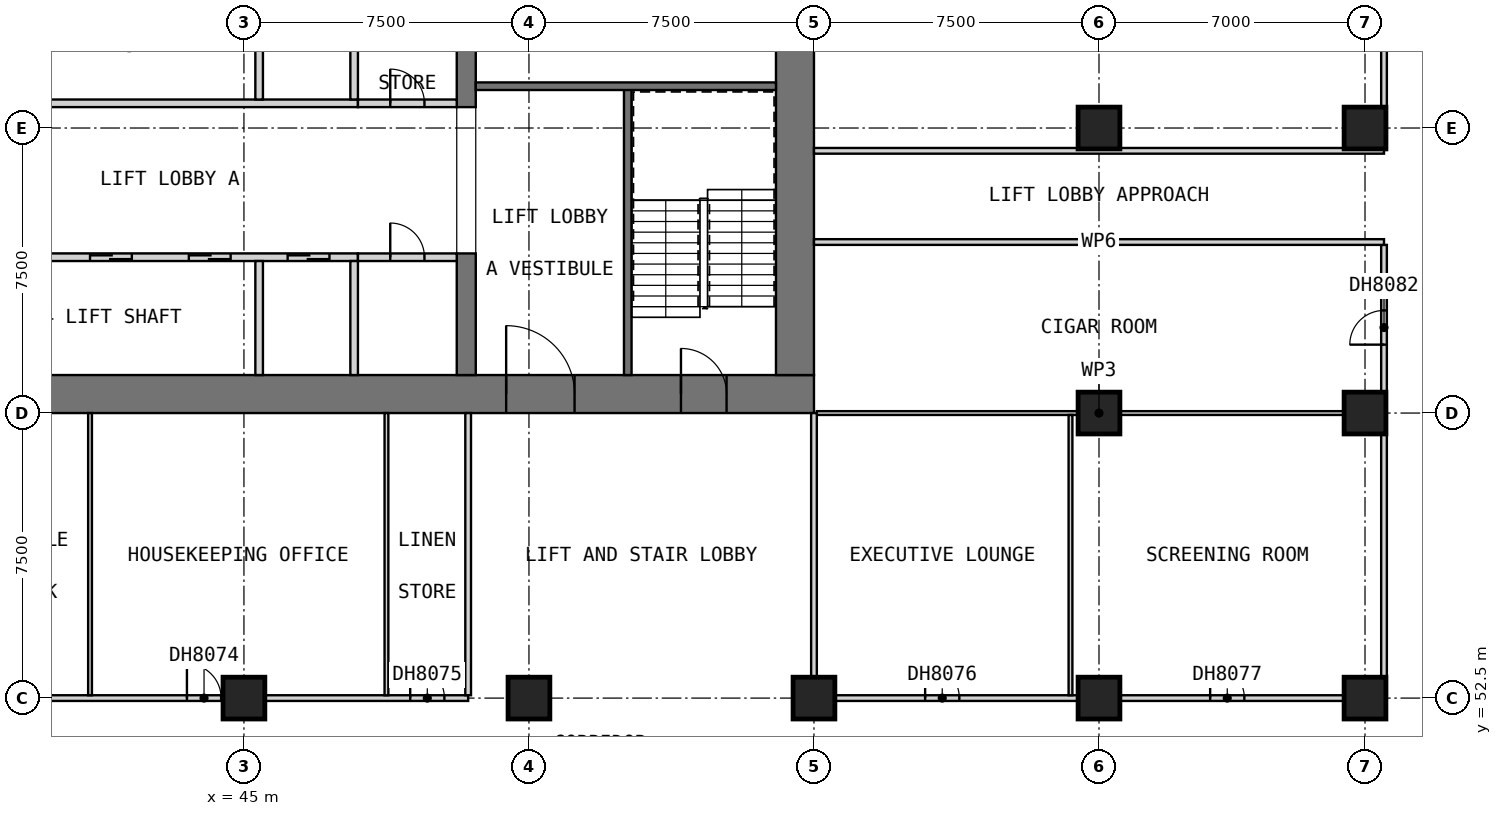
"""IFC4 building model, lengths in metres.
Left out: names, types, materials, properties, quantities, classifications, styles, units other than length and angle.
Written with IfcOpenShell. Run it as: python <this file> out.ifc"""

import sys

from ifc_helpers import new_model, si_unit, direction, frame, frame_2d, origin, origin_2d, place, context, subcontext, project, spatial, rectangle, extrude, element, fill, save


model = new_model("IFC4")
c1 = context("Model", 3, precision=1e-05, world=origin(), true_north=direction((0.0, 1.0)))
c2 = subcontext(c1, "Body", "Model", "MODEL_VIEW")
j1 = project(units=[si_unit("LENGTHUNIT", "METRE"), si_unit("PLANEANGLEUNIT", "RADIAN")], contexts=[c1])
p1 = place(None, origin())
s1 = spatial("IfcSite", under=j1, at=p1, CompositionType="ELEMENT")
p2 = place(p1, origin())
s2 = spatial("IfcBuilding", under=s1, at=p2, CompositionType="ELEMENT")
p3 = place(p2, frame((0.0, 0.0, 89.9)))
s3 = spatial("IfcBuildingStorey", under=s2, at=p3, CompositionType="ELEMENT", Elevation=89.9)
for number, where, z_axis, x_axis in (
    (1, (45.0, 52.5, 0.0), (0.0, 0.0, 1.0), (1.0, 0.0, 0.0)),
    (2, (52.5, 52.5, 0.0), (0.0, 0.0, 1.0), (1.0, 0.0, 0.0)),
    (3, (60.0, 52.5, 0.0), (0.0, 0.0, 1.0), (1.0, 0.0, 0.0)),
    (4, (67.5, 52.5, 0.0), (0.0, 0.0, 1.0), (1.0, 0.0, 0.0)),
    (5, (67.5, 60.0, 0.0), (0.0, 0.0, 1.0), (1.0, 0.0, 0.0)),
    (6, (67.5, 67.5, 0.0), (0.0, 0.0, 1.0), (1.0, 0.0, 0.0)),
    (7, (74.5, 52.5, 0.0), (0.0, 0.0, 1.0), (1.0, 0.0, 0.0)),
    (8, (74.5, 60.0, 0.0), (0.0, 0.0, 1.0), (1.0, 0.0, 0.0)),
    (9, (74.5, 67.5, 0.0), (0.0, 0.0, 1.0), (1.0, 0.0, 0.0)),
):
    element("IfcColumn", number, at=place(p3, frame(where, z_axis=z_axis, x_axis=x_axis)), inside=s3, PredefinedType="COLUMN", context=c2, shape_type="SweptSolid", body=[
        extrude(rectangle(XDim=1.1, YDim=1.1, at=origin_2d()), origin(), (0.0, 0.0, 1.0), 3.6),
    ])
p4 = place(p3, frame((30.0, 60.5, 0.0), z_axis=(0.0, 0.0, 1.0), x_axis=(1.0, 0.0, 0.0)))
e10 = element("IfcWall", 10, at=p4, inside=s3, PredefinedType="SHEAR", context=c2, shape_type="SweptSolid", body=[
    extrude(rectangle(XDim=30.0, YDim=1.0, at=frame_2d((15.0, 0.0))), origin(), (0.0, 0.0, 1.0), 3.6),
])
p5 = place(p4, frame((21.9, 0.0, 0.0)))
e11 = element("IfcOpeningElement", 11, at=p5, cuts=e10, PredefinedType="OPENING", context=c2, shape_type="SweptSolid", body=[
    extrude(rectangle(XDim=1.8, YDim=2.1, at=frame_2d((0.9, 1.05))), frame((0.0, 0.51, 0.0), z_axis=(0.0, -1.0, 0.0), x_axis=(1.0, 0.0, 0.0)), (0.0, 0.0, 1.0), 1.02),
])
p6 = place(p4, frame((26.5, 0.0, 0.0)))
e12 = element("IfcOpeningElement", 12, at=p6, cuts=e10, PredefinedType="OPENING", context=c2, shape_type="SweptSolid", body=[
    extrude(rectangle(XDim=1.2, YDim=2.1, at=frame_2d((0.6, 1.05))), frame((0.0, 0.51, 0.0), z_axis=(0.0, -1.0, 0.0), x_axis=(1.0, 0.0, 0.0)), (0.0, 0.0, 1.0), 1.02),
])
p7 = place(p3, frame((59.5, 61.0, 0.0), z_axis=(0.0, 0.0, 1.0), x_axis=(0.0, 1.0, 0.0)))
e13 = element("IfcWall", 13, at=p7, inside=s3, PredefinedType="SHEAR", context=c2, shape_type="SweptSolid", body=[
    extrude(rectangle(XDim=20.5, YDim=1.0, at=frame_2d((10.25, 0.0))), origin(), (0.0, 0.0, 1.0), 3.6),
])
p8 = place(p7, frame((14.5, 0.0, 0.0)))
e14 = element("IfcOpeningElement", 14, at=p8, cuts=e13, PredefinedType="OPENING", context=c2, shape_type="SweptSolid", body=[
    extrude(rectangle(XDim=1.8, YDim=2.1, at=frame_2d((0.9, 1.05))), frame((0.0, 0.51, 0.0), z_axis=(0.0, -1.0, 0.0), x_axis=(1.0, 0.0, 0.0)), (0.0, 0.0, 1.0), 1.02),
])
p9 = place(p3, frame((50.85, 61.0, 0.0), z_axis=(0.0, 0.0, 1.0), x_axis=(0.0, 1.0, 0.0)))
e15 = element("IfcWall", 15, at=p9, inside=s3, PredefinedType="SHEAR", context=c2, shape_type="SweptSolid", body=[
    extrude(rectangle(XDim=3.2, YDim=0.5, at=frame_2d((1.6, 0.0))), origin(), (0.0, 0.0, 1.0), 3.6),
])
p10 = place(p3, frame((50.85, 68.05, 0.0), z_axis=(0.0, 0.0, 1.0), x_axis=(0.0, 1.0, 0.0)))
e16 = element("IfcWall", 16, at=p10, inside=s3, PredefinedType="SHEAR", context=c2, shape_type="SweptSolid", body=[
    extrude(rectangle(XDim=6.4, YDim=0.5, at=frame_2d((3.2, 0.0))), origin(), (0.0, 0.0, 1.0), 3.6),
])
p11 = place(p3, frame((35.0, 64.1, 0.0), z_axis=(0.0, 0.0, 1.0), x_axis=(1.0, 0.0, 0.0)))
e17 = element("IfcWall", 17, at=p11, inside=s3, PredefinedType="SOLIDWALL", context=c2, shape_type="SweptSolid", body=[
    extrude(rectangle(XDim=13.0, YDim=0.2, at=frame_2d((6.5, 0.0))), origin(), (0.0, 0.0, 1.0), 3.6),
])
p12 = place(p11, frame((0.75, 0.0, 0.0)))
e18 = element("IfcOpeningElement", 18, at=p12, cuts=e17, PredefinedType="OPENING", context=c2, shape_type="SweptSolid", body=[
    extrude(rectangle(XDim=1.1, YDim=2.1, at=frame_2d((0.55, 1.05))), frame((0.0, 0.11, 0.0), z_axis=(0.0, -1.0, 0.0), x_axis=(1.0, 0.0, 0.0)), (0.0, 0.0, 1.0), 0.22),
])
p13 = place(p11, frame((3.35, 0.0, 0.0)))
e19 = element("IfcOpeningElement", 19, at=p13, cuts=e17, PredefinedType="OPENING", context=c2, shape_type="SweptSolid", body=[
    extrude(rectangle(XDim=1.1, YDim=2.1, at=frame_2d((0.55, 1.05))), frame((0.0, 0.11, 0.0), z_axis=(0.0, -1.0, 0.0), x_axis=(1.0, 0.0, 0.0)), (0.0, 0.0, 1.0), 0.22),
])
p14 = place(p11, frame((5.95, 0.0, 0.0)))
e20 = element("IfcOpeningElement", 20, at=p14, cuts=e17, PredefinedType="OPENING", context=c2, shape_type="SweptSolid", body=[
    extrude(rectangle(XDim=1.1, YDim=2.1, at=frame_2d((0.55, 1.05))), frame((0.0, 0.11, 0.0), z_axis=(0.0, -1.0, 0.0), x_axis=(1.0, 0.0, 0.0)), (0.0, 0.0, 1.0), 0.22),
])
p15 = place(p11, frame((8.55, 0.0, 0.0)))
e21 = element("IfcOpeningElement", 21, at=p15, cuts=e17, PredefinedType="OPENING", context=c2, shape_type="SweptSolid", body=[
    extrude(rectangle(XDim=1.1, YDim=2.1, at=frame_2d((0.55, 1.05))), frame((0.0, 0.11, 0.0), z_axis=(0.0, -1.0, 0.0), x_axis=(1.0, 0.0, 0.0)), (0.0, 0.0, 1.0), 0.22),
])
p16 = place(p11, frame((11.15, 0.0, 0.0)))
e22 = element("IfcOpeningElement", 22, at=p16, cuts=e17, PredefinedType="OPENING", context=c2, shape_type="SweptSolid", body=[
    extrude(rectangle(XDim=1.1, YDim=2.1, at=frame_2d((0.55, 1.05))), frame((0.0, 0.11, 0.0), z_axis=(0.0, -1.0, 0.0), x_axis=(1.0, 0.0, 0.0)), (0.0, 0.0, 1.0), 0.22),
])
for number, where, z_axis, x_axis in (
    (23, (45.4, 61.0, 0.0), (0.0, 0.0, 1.0), (0.0, 1.0, 0.0)),
    (24, (47.9, 61.0, 0.0), (0.0, 0.0, 1.0), (0.0, 1.0, 0.0)),
):
    element("IfcWall", number, at=place(p3, frame(where, z_axis=z_axis, x_axis=x_axis)), inside=s3, PredefinedType="SOLIDWALL", context=c2, shape_type="SweptSolid", body=[
        extrude(rectangle(XDim=3.0, YDim=0.2, at=frame_2d((1.5, 0.0))), origin(), (0.0, 0.0, 1.0), 3.6),
    ])
p17 = place(p3, frame((48.0, 64.1, 0.0), z_axis=(0.0, 0.0, 1.0), x_axis=(1.0, 0.0, 0.0)))
e25 = element("IfcWall", 25, at=p17, inside=s3, PredefinedType="PARTITIONING", context=c2, shape_type="SweptSolid", body=[
    extrude(rectangle(XDim=2.6, YDim=0.2, at=frame_2d((1.3, 0.0))), origin(), (0.0, 0.0, 1.0), 3.35),
])
p18 = place(p17, frame((0.85, 0.0, 0.0)))
e26 = element("IfcOpeningElement", 26, at=p18, cuts=e25, PredefinedType="OPENING", context=c2, shape_type="SweptSolid", body=[
    extrude(rectangle(XDim=0.9, YDim=2.1, at=frame_2d((0.45, 1.05))), frame((0.0, 0.11, 0.0), z_axis=(0.0, -1.0, 0.0), x_axis=(1.0, 0.0, 0.0)), (0.0, 0.0, 1.0), 0.22),
])
p19 = place(p3, frame((35.0, 68.15, 0.0), z_axis=(0.0, 0.0, 1.0), x_axis=(1.0, 0.0, 0.0)))
e27 = element("IfcWall", 27, at=p19, inside=s3, PredefinedType="SOLIDWALL", context=c2, shape_type="SweptSolid", body=[
    extrude(rectangle(XDim=13.0, YDim=0.2, at=frame_2d((6.5, 0.0))), origin(), (0.0, 0.0, 1.0), 3.6),
])
p20 = place(p19, frame((0.75, 0.0, 0.0)))
e28 = element("IfcOpeningElement", 28, at=p20, cuts=e27, PredefinedType="OPENING", context=c2, shape_type="SweptSolid", body=[
    extrude(rectangle(XDim=1.1, YDim=2.1, at=frame_2d((0.55, 1.05))), frame((0.0, 0.11, 0.0), z_axis=(0.0, -1.0, 0.0), x_axis=(1.0, 0.0, 0.0)), (0.0, 0.0, 1.0), 0.22),
])
for number, where, z_axis, x_axis in (
    (29, (45.4, 68.25, 0.0), (0.0, 0.0, 1.0), (0.0, 1.0, 0.0)),
    (30, (47.9, 68.25, 0.0), (0.0, 0.0, 1.0), (0.0, 1.0, 0.0)),
):
    element("IfcWall", number, at=place(p3, frame(where, z_axis=z_axis, x_axis=x_axis)), inside=s3, PredefinedType="SOLIDWALL", context=c2, shape_type="SweptSolid", body=[
        extrude(rectangle(XDim=2.75, YDim=0.2, at=frame_2d((1.375, 0.0))), origin(), (0.0, 0.0, 1.0), 3.6),
    ])
p21 = place(p3, frame((48.0, 68.15, 0.0), z_axis=(0.0, 0.0, 1.0), x_axis=(1.0, 0.0, 0.0)))
e31 = element("IfcWall", 31, at=p21, inside=s3, PredefinedType="PARTITIONING", context=c2, shape_type="SweptSolid", body=[
    extrude(rectangle(XDim=2.6, YDim=0.2, at=frame_2d((1.3, 0.0))), origin(), (0.0, 0.0, 1.0), 3.35),
])
p22 = place(p21, frame((0.85, 0.0, 0.0)))
e32 = element("IfcOpeningElement", 32, at=p22, cuts=e31, PredefinedType="OPENING", context=c2, shape_type="SweptSolid", body=[
    extrude(rectangle(XDim=0.9, YDim=2.1, at=frame_2d((0.45, 1.05))), frame((0.0, 0.11, 0.0), z_axis=(0.0, -1.0, 0.0), x_axis=(1.0, 0.0, 0.0)), (0.0, 0.0, 1.0), 0.22),
])
p23 = place(p3, frame((55.1, 61.0, 0.0), z_axis=(0.0, 0.0, 1.0), x_axis=(0.0, 1.0, 0.0)))
e33 = element("IfcWall", 33, at=p23, inside=s3, PredefinedType="SOLIDWALL", context=c2, shape_type="SweptSolid", body=[
    extrude(rectangle(XDim=7.6, YDim=0.2, at=frame_2d((3.8, 0.0))), origin(), (0.0, 0.0, 1.0), 3.35),
])
p24 = place(p3, frame((51.1, 68.6, 0.0), z_axis=(0.0, 0.0, 1.0), x_axis=(1.0, 0.0, 0.0)))
e34 = element("IfcWall", 34, at=p24, inside=s3, PredefinedType="SOLIDWALL", context=c2, shape_type="SweptSolid", body=[
    extrude(rectangle(XDim=7.9, YDim=0.2, at=frame_2d((3.95, 0.0))), origin(), (0.0, 0.0, 1.0), 3.35),
])
p25 = place(p3, frame((33.75, 52.5, 0.0), z_axis=(0.0, 0.0, 1.0), x_axis=(1.0, 0.0, 0.0)))
e35 = element("IfcWall", 35, at=p25, inside=s3, PredefinedType="PARTITIONING", context=c2, shape_type="SweptSolid", body=[
    extrude(rectangle(XDim=17.15, YDim=0.15, at=frame_2d((8.575, 0.0))), origin(), (0.0, 0.0, 1.0), 3.35),
])
p26 = place(p25, frame((1.05, 0.0, 0.0)))
e36 = element("IfcOpeningElement", 36, at=p26, cuts=e35, PredefinedType="OPENING", context=c2, shape_type="SweptSolid", body=[
    extrude(rectangle(XDim=0.9, YDim=2.1, at=frame_2d((0.45, 1.05))), frame((0.0, 0.085, 0.0), z_axis=(0.0, -1.0, 0.0), x_axis=(1.0, 0.0, 0.0)), (0.0, 0.0, 1.0), 0.17),
])
p27 = place(p25, frame((4.65, 0.0, 0.0)))
e37 = element("IfcOpeningElement", 37, at=p27, cuts=e35, PredefinedType="OPENING", context=c2, shape_type="SweptSolid", body=[
    extrude(rectangle(XDim=0.9, YDim=2.1, at=frame_2d((0.45, 1.05))), frame((0.0, 0.085, 0.0), z_axis=(0.0, -1.0, 0.0), x_axis=(1.0, 0.0, 0.0)), (0.0, 0.0, 1.0), 0.17),
])
p28 = place(p25, frame((9.75, 0.0, 0.0)))
e38 = element("IfcOpeningElement", 38, at=p28, cuts=e35, PredefinedType="OPENING", context=c2, shape_type="SweptSolid", body=[
    extrude(rectangle(XDim=0.9, YDim=2.1, at=frame_2d((0.45, 1.05))), frame((0.0, 0.085, 0.0), z_axis=(0.0, -1.0, 0.0), x_axis=(1.0, 0.0, 0.0)), (0.0, 0.0, 1.0), 0.17),
])
p29 = place(p25, frame((15.625, 0.0, 0.0)))
e39 = element("IfcOpeningElement", 39, at=p29, cuts=e35, PredefinedType="OPENING", context=c2, shape_type="SweptSolid", body=[
    extrude(rectangle(XDim=0.9, YDim=2.1, at=frame_2d((0.45, 1.05))), frame((0.0, 0.085, 0.0), z_axis=(0.0, -1.0, 0.0), x_axis=(1.0, 0.0, 0.0)), (0.0, 0.0, 1.0), 0.17),
])
p30 = place(p3, frame((60.0, 52.5, 0.0), z_axis=(0.0, 0.0, 1.0), x_axis=(1.0, 0.0, 0.0)))
e40 = element("IfcWall", 40, at=p30, inside=s3, PredefinedType="PARTITIONING", context=c2, shape_type="SweptSolid", body=[
    extrude(rectangle(XDim=15.0, YDim=0.15, at=frame_2d((7.5, 0.0))), origin(), (0.0, 0.0, 1.0), 3.35),
])
p31 = place(p30, frame((2.925, 0.0, 0.0)))
e41 = element("IfcOpeningElement", 41, at=p31, cuts=e40, PredefinedType="OPENING", context=c2, shape_type="SweptSolid", body=[
    extrude(rectangle(XDim=0.9, YDim=2.1, at=frame_2d((0.45, 1.05))), frame((0.0, 0.085, 0.0), z_axis=(0.0, -1.0, 0.0), x_axis=(1.0, 0.0, 0.0)), (0.0, 0.0, 1.0), 0.17),
])
p32 = place(p30, frame((10.425, 0.0, 0.0)))
e42 = element("IfcOpeningElement", 42, at=p32, cuts=e40, PredefinedType="OPENING", context=c2, shape_type="SweptSolid", body=[
    extrude(rectangle(XDim=0.9, YDim=2.1, at=frame_2d((0.45, 1.05))), frame((0.0, 0.085, 0.0), z_axis=(0.0, -1.0, 0.0), x_axis=(1.0, 0.0, 0.0)), (0.0, 0.0, 1.0), 0.17),
])
p33 = place(p3, frame((75.0, 52.575, 0.0), z_axis=(0.0, 0.0, 1.0), x_axis=(0.0, 1.0, 0.0)))
e43 = element("IfcWall", 43, at=p33, inside=s3, PredefinedType="PARTITIONING", context=c2, shape_type="SweptSolid", body=[
    extrude(rectangle(XDim=11.85, YDim=0.15, at=frame_2d((5.925, 0.0))), origin(), (0.0, 0.0, 1.0), 3.35),
])
p34 = place(p33, frame((9.225, 0.0, 0.0)))
e44 = element("IfcOpeningElement", 44, at=p34, cuts=e43, PredefinedType="OPENING", context=c2, shape_type="SweptSolid", body=[
    extrude(rectangle(XDim=0.9, YDim=2.1, at=frame_2d((0.45, 1.05))), frame((0.0, 0.085, 0.0), z_axis=(0.0, -1.0, 0.0), x_axis=(1.0, 0.0, 0.0)), (0.0, 0.0, 1.0), 0.17),
])
p35 = place(p3, frame((75.0, 66.975, 0.0), z_axis=(0.0, 0.0, 1.0), x_axis=(0.0, 1.0, 0.0)))
e45 = element("IfcWall", 45, at=p35, inside=s3, PredefinedType="PARTITIONING", context=c2, shape_type="SweptSolid", body=[
    extrude(rectangle(XDim=8.55, YDim=0.15, at=frame_2d((4.275, 0.0))), origin(), (0.0, 0.0, 1.0), 3.35),
])
p36 = place(p35, frame((3.825, 0.0, 0.0)))
e46 = element("IfcOpeningElement", 46, at=p36, cuts=e45, PredefinedType="OPENING", context=c2, shape_type="SweptSolid", body=[
    extrude(rectangle(XDim=0.9, YDim=2.1, at=frame_2d((0.45, 1.05))), frame((0.0, 0.085, 0.0), z_axis=(0.0, -1.0, 0.0), x_axis=(1.0, 0.0, 0.0)), (0.0, 0.0, 1.0), 0.17),
])
p37 = place(p3, frame((60.075, 60.0, 0.0), z_axis=(0.0, 0.0, 1.0), x_axis=(1.0, 0.0, 0.0)))
e47 = element("IfcWall", 47, at=p37, inside=s3, PredefinedType="PARTITIONING", context=c2, shape_type="SweptSolid", body=[
    extrude(rectangle(XDim=14.85, YDim=0.1, at=frame_2d((7.425, 0.0))), origin(), (0.0, 0.0, 1.0), 3.35),
])
for number, where, z_axis, x_axis in (
    (48, (40.95, 52.575, 0.0), (0.0, 0.0, 1.0), (0.0, 1.0, 0.0)),
    (49, (48.75, 52.575, 0.0), (0.0, 0.0, 1.0), (0.0, 1.0, 0.0)),
):
    element("IfcWall", number, at=place(p3, frame(where, z_axis=z_axis, x_axis=x_axis)), inside=s3, PredefinedType="PARTITIONING", context=c2, shape_type="SweptSolid", body=[
        extrude(rectangle(XDim=7.425, YDim=0.1, at=frame_2d((3.712, 0.0))), origin(), (0.0, 0.0, 1.0), 3.35),
    ])
p38 = place(p3, frame((66.75, 52.575, 0.0), z_axis=(0.0, 0.0, 1.0), x_axis=(0.0, 1.0, 0.0)))
e50 = element("IfcWall", 50, at=p38, inside=s3, PredefinedType="PARTITIONING", context=c2, shape_type="SweptSolid", body=[
    extrude(rectangle(XDim=7.375, YDim=0.1, at=frame_2d((3.688, 0.0))), origin(), (0.0, 0.0, 1.0), 3.35),
])
for number, where, z_axis, x_axis in (
    (51, (60.0, 64.5, 0.0), (0.0, 0.0, 1.0), (1.0, 0.0, 0.0)),
    (52, (60.0, 66.9, 0.0), (0.0, 0.0, 1.0), (1.0, 0.0, 0.0)),
):
    element("IfcWall", number, at=place(p3, frame(where, z_axis=z_axis, x_axis=x_axis)), inside=s3, PredefinedType="PARTITIONING", context=c2, shape_type="SweptSolid", body=[
        extrude(rectangle(XDim=15.0, YDim=0.15, at=frame_2d((7.5, 0.0))), origin(), (0.0, 0.0, 1.0), 3.35),
    ])
for number, where, z_axis, x_axis in (
    (53, (50.9, 52.575, 0.0), (0.0, 0.0, 1.0), (0.0, 1.0, 0.0)),
    (54, (60.0, 52.575, 0.0), (0.0, 0.0, 1.0), (0.0, 1.0, 0.0)),
):
    element("IfcWall", number, at=place(p3, frame(where, z_axis=z_axis, x_axis=x_axis)), inside=s3, PredefinedType="PARTITIONING", context=c2, shape_type="SweptSolid", body=[
        extrude(rectangle(XDim=7.425, YDim=0.15, at=frame_2d((3.712, 0.0))), origin(), (0.0, 0.0, 1.0), 3.35),
    ])
p39 = place(p14, origin())
e55 = element("IfcDoor", 55, at=p39, inside=s3, OperationType="DOUBLE_DOOR_SLIDING", PredefinedType="DOOR", context=c2, shape_type="SweptSolid", body=[
    extrude(rectangle(XDim=1.1, YDim=2.1, at=frame_2d((0.55, 1.05))), frame((0.0, 0.025, 0.0), z_axis=(0.0, -1.0, 0.0), x_axis=(1.0, 0.0, 0.0)), (0.0, 0.0, 1.0), 0.05),
])
fill(e20, e55)
p40 = place(p15, origin())
e56 = element("IfcDoor", 56, at=p40, inside=s3, OperationType="DOUBLE_DOOR_SLIDING", PredefinedType="DOOR", context=c2, shape_type="SweptSolid", body=[
    extrude(rectangle(XDim=1.1, YDim=2.1, at=frame_2d((0.55, 1.05))), frame((0.0, 0.025, 0.0), z_axis=(0.0, -1.0, 0.0), x_axis=(1.0, 0.0, 0.0)), (0.0, 0.0, 1.0), 0.05),
])
fill(e21, e56)
p41 = place(p16, origin())
e57 = element("IfcDoor", 57, at=p41, inside=s3, OperationType="DOUBLE_DOOR_SLIDING", PredefinedType="DOOR", context=c2, shape_type="SweptSolid", body=[
    extrude(rectangle(XDim=1.1, YDim=2.1, at=frame_2d((0.55, 1.05))), frame((0.0, 0.025, 0.0), z_axis=(0.0, -1.0, 0.0), x_axis=(1.0, 0.0, 0.0)), (0.0, 0.0, 1.0), 0.05),
])
fill(e22, e57)
p42 = place(p18, origin())
e58 = element("IfcDoor", 58, at=p42, inside=s3, OperationType="SINGLE_SWING_LEFT", PredefinedType="DOOR", context=c2, shape_type="SweptSolid", body=[
    extrude(rectangle(XDim=0.9, YDim=2.1, at=frame_2d((0.45, 1.05))), frame((0.0, 0.025, 0.0), z_axis=(0.0, -1.0, 0.0), x_axis=(1.0, 0.0, 0.0)), (0.0, 0.0, 1.0), 0.05),
])
fill(e26, e58)
p43 = place(p22, origin())
e59 = element("IfcDoor", 59, at=p43, inside=s3, OperationType="SINGLE_SWING_LEFT", PredefinedType="DOOR", context=c2, shape_type="SweptSolid", body=[
    extrude(rectangle(XDim=0.9, YDim=2.1, at=frame_2d((0.45, 1.05))), frame((0.0, 0.025, 0.0), z_axis=(0.0, -1.0, 0.0), x_axis=(1.0, 0.0, 0.0)), (0.0, 0.0, 1.0), 0.05),
])
fill(e32, e59)
p44 = place(p5, origin())
e60 = element("IfcDoor", 60, at=p44, inside=s3, OperationType="DOUBLE_DOOR_SINGLE_SWING", PredefinedType="DOOR", context=c2, shape_type="SweptSolid", body=[
    extrude(rectangle(XDim=1.8, YDim=2.1, at=frame_2d((0.9, 1.05))), frame((0.0, 0.025, 0.0), z_axis=(0.0, -1.0, 0.0), x_axis=(1.0, 0.0, 0.0)), (0.0, 0.0, 1.0), 0.05),
])
fill(e11, e60)
p45 = place(p6, origin())
e61 = element("IfcDoor", 61, at=p45, inside=s3, OperationType="SINGLE_SWING_LEFT", PredefinedType="DOOR", context=c2, shape_type="SweptSolid", body=[
    extrude(rectangle(XDim=1.2, YDim=2.1, at=frame_2d((0.6, 1.05))), frame((0.0, 0.025, 0.0), z_axis=(0.0, -1.0, 0.0), x_axis=(1.0, 0.0, 0.0)), (0.0, 0.0, 1.0), 0.05),
])
fill(e12, e61)
p46 = place(p28, origin())
e62 = element("IfcDoor", 62, at=p46, inside=s3, OperationType="SINGLE_SWING_LEFT", PredefinedType="DOOR", context=c2, shape_type="SweptSolid", body=[
    extrude(rectangle(XDim=0.9, YDim=2.1, at=frame_2d((0.45, 1.05))), frame((0.0, 0.025, 0.0), z_axis=(0.0, -1.0, 0.0), x_axis=(1.0, 0.0, 0.0)), (0.0, 0.0, 1.0), 0.05),
])
fill(e38, e62)
p47 = place(p29, origin())
e63 = element("IfcDoor", 63, at=p47, inside=s3, OperationType="SINGLE_SWING_LEFT", PredefinedType="DOOR", context=c2, shape_type="SweptSolid", body=[
    extrude(rectangle(XDim=0.9, YDim=2.1, at=frame_2d((0.45, 1.05))), frame((0.0, 0.025, 0.0), z_axis=(0.0, -1.0, 0.0), x_axis=(1.0, 0.0, 0.0)), (0.0, 0.0, 1.0), 0.05),
])
fill(e39, e63)
p48 = place(p31, origin())
e64 = element("IfcDoor", 64, at=p48, inside=s3, OperationType="SINGLE_SWING_LEFT", PredefinedType="DOOR", context=c2, shape_type="SweptSolid", body=[
    extrude(rectangle(XDim=0.9, YDim=2.1, at=frame_2d((0.45, 1.05))), frame((0.0, 0.025, 0.0), z_axis=(0.0, -1.0, 0.0), x_axis=(1.0, 0.0, 0.0)), (0.0, 0.0, 1.0), 0.05),
])
fill(e41, e64)
p49 = place(p32, origin())
e65 = element("IfcDoor", 65, at=p49, inside=s3, OperationType="SINGLE_SWING_LEFT", PredefinedType="DOOR", context=c2, shape_type="SweptSolid", body=[
    extrude(rectangle(XDim=0.9, YDim=2.1, at=frame_2d((0.45, 1.05))), frame((0.0, 0.025, 0.0), z_axis=(0.0, -1.0, 0.0), x_axis=(1.0, 0.0, 0.0)), (0.0, 0.0, 1.0), 0.05),
])
fill(e42, e65)
p50 = place(p34, origin())
e66 = element("IfcDoor", 66, at=p50, inside=s3, OperationType="SINGLE_SWING_LEFT", PredefinedType="DOOR", context=c2, shape_type="SweptSolid", body=[
    extrude(rectangle(XDim=0.9, YDim=2.1, at=frame_2d((0.45, 1.05))), frame((0.0, 0.025, 0.0), z_axis=(0.0, -1.0, 0.0), x_axis=(1.0, 0.0, 0.0)), (0.0, 0.0, 1.0), 0.05),
])
fill(e44, e66)
save(model, sys.argv[1])
